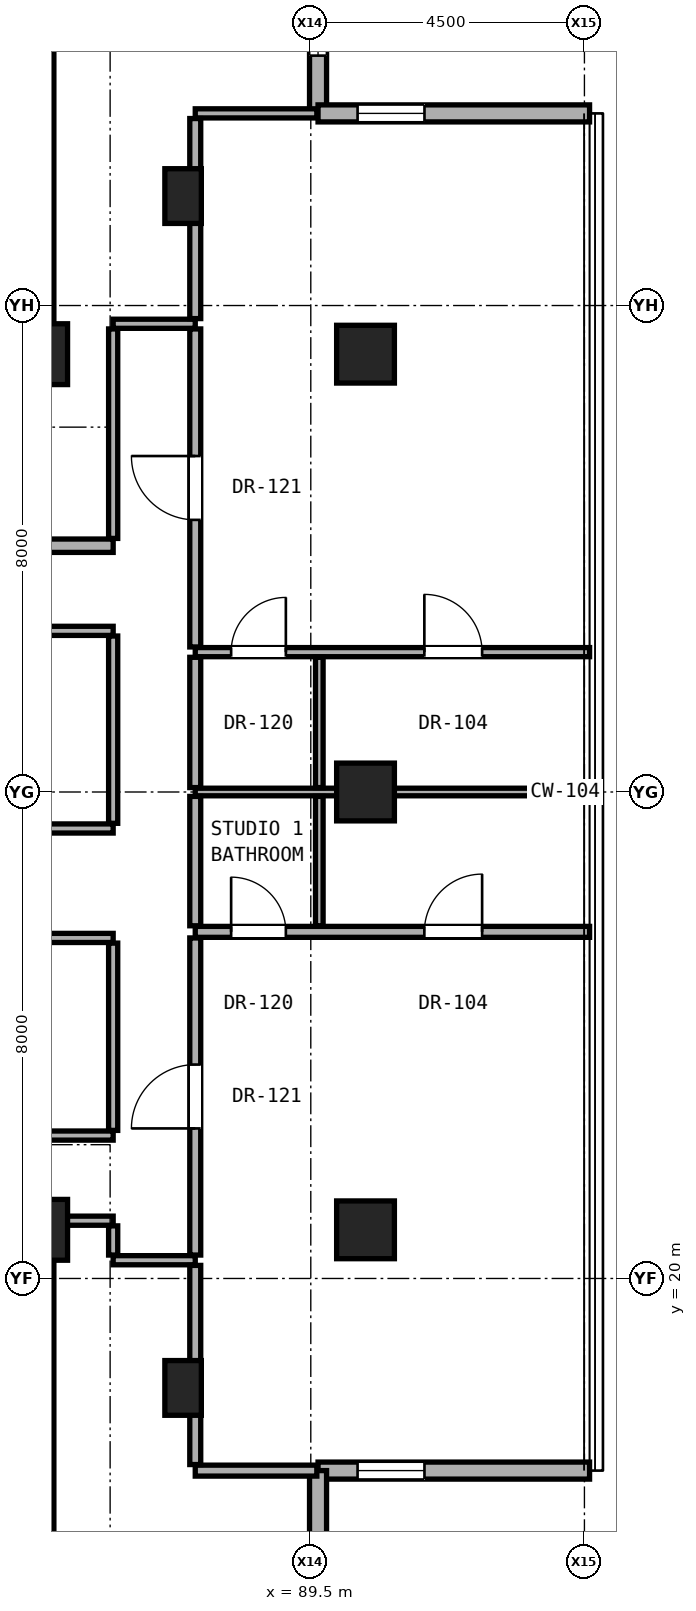
"""IFC4 building model, lengths in metres.
Left out: names, types, materials, properties, quantities, classifications, styles, units other than length and angle.
Written with IfcOpenShell. Run it as: python <this file> out.ifc"""

import sys

from ifc_helpers import new_model, si_unit, direction, frame, frame_2d, origin, origin_2d, place, context, subcontext, project, spatial, rectangle, hollow_rectangle, extrude, element, fill, save


model = new_model("IFC4")
c1 = context("Model", 3, precision=1e-05, world=origin(), true_north=direction((0.0, 1.0)))
c2 = subcontext(c1, "Body", "Model", "MODEL_VIEW")
j1 = project(units=[si_unit("LENGTHUNIT", "METRE"), si_unit("PLANEANGLEUNIT", "RADIAN")], contexts=[c1])
p1 = place(None, origin())
s1 = spatial("IfcSite", under=j1, at=p1, CompositionType="ELEMENT")
p2 = place(p1, origin())
s2 = spatial("IfcBuilding", under=s1, at=p2, CompositionType="ELEMENT")
p3 = place(p2, frame((0.0, 0.0, 167.4)))
s3 = spatial("IfcBuildingStorey", under=s2, at=p3, CompositionType="ELEMENT", Elevation=167.4)
for number, where, z_axis, x_axis in (
    (1, (85.0, 20.8, 0.0), (0.0, 0.0, 1.0), (1.0, 0.0, 0.0)),
    (2, (85.0, 35.2, 0.0), (0.0, 0.0, 1.0), (1.0, 0.0, 0.0)),
):
    element("IfcColumn", number, at=place(p3, frame(where, z_axis=z_axis, x_axis=x_axis)), inside=s3, PredefinedType="COLUMN", context=c2, shape_type="SweptSolid", body=[
        extrude(rectangle(XDim=1.0, YDim=1.0, at=origin_2d()), origin(), (0.0, 0.0, 1.0), 3.25),
    ])
for number, where, z_axis, x_axis in (
    (3, (90.4, 20.8, 0.0), (0.0, 0.0, 1.0), (1.0, 0.0, 0.0)),
    (4, (90.4, 28.0, 0.0), (0.0, 0.0, 1.0), (1.0, 0.0, 0.0)),
    (5, (90.4, 35.2, 0.0), (0.0, 0.0, 1.0), (1.0, 0.0, 0.0)),
):
    element("IfcColumn", number, at=place(p3, frame(where, z_axis=z_axis, x_axis=x_axis)), inside=s3, PredefinedType="COLUMN", context=c2, shape_type="SweptSolid", body=[
        extrude(hollow_rectangle(XDim=0.95, YDim=0.95, WallThickness=0.05, at=origin_2d()), origin(), (0.0, 0.0, 1.0), 3.25),
    ])
for number, where, z_axis, x_axis in (
    (6, (87.4, 18.2, 0.0), (0.0, 0.0, 1.0), (1.0, 0.0, 0.0)),
    (7, (87.4, 37.8, 0.0), (0.0, 0.0, 1.0), (1.0, 0.0, 0.0)),
):
    element("IfcColumn", number, at=place(p3, frame(where, z_axis=z_axis, x_axis=x_axis)), inside=s3, PredefinedType="PILASTER", context=c2, shape_type="SweptSolid", body=[
        extrude(rectangle(XDim=0.6, YDim=0.9, at=origin_2d()), origin(), (0.0, 0.0, 1.0), 3.25),
    ])
for number, where, z_axis, x_axis in (
    (8, (85.0, 35.2, 0.0), (0.0, 0.0, 1.0), (0.0, 1.0, 0.0)),
    (9, (85.0, 15.2, 0.0), (0.0, 0.0, 1.0), (0.0, 1.0, 0.0)),
):
    element("IfcWall", number, at=place(p3, frame(where, z_axis=z_axis, x_axis=x_axis)), inside=s3, PredefinedType="SHEAR", context=c2, shape_type="SweptSolid", body=[
        extrude(rectangle(XDim=5.6, YDim=0.55, at=frame_2d((2.8, 0.0))), origin(), (0.0, 0.0, 1.0), 3.05),
    ])
p4 = place(p3, frame((89.619, 39.159, 0.0), z_axis=(0.0, 0.0, 1.0), x_axis=(0.0, 1.0, 0.0)))
e10 = element("IfcWall", 10, at=p4, inside=s3, PredefinedType="SOLIDWALL", context=c2, shape_type="SweptSolid", body=[
    extrude(rectangle(XDim=4.465, YDim=0.28, at=frame_2d((2.233, 0.0))), origin(), (0.0, 0.0, 1.0), 3.03),
])
p5 = place(p4, frame((0.95, 0.0, 0.85)))
e11 = element("IfcOpeningElement", 11, at=p5, cuts=e10, PredefinedType="OPENING", context=c2, shape_type="SweptSolid", body=[
    extrude(rectangle(XDim=1.1, YDim=2.0, at=frame_2d((0.55, 1.0))), frame((0.0, 0.15, 0.0), z_axis=(0.0, -1.0, 0.0), x_axis=(1.0, 0.0, 0.0)), (0.0, 0.0, 1.0), 0.3),
])
p6 = place(p3, frame((89.619, 16.841, 0.0), z_axis=(0.0, 0.0, 1.0), x_axis=(1.0, 0.0, 0.0)))
e12 = element("IfcWall", 12, at=p6, inside=s3, PredefinedType="SOLIDWALL", context=c2, shape_type="SweptSolid", body=[
    extrude(rectangle(XDim=4.465, YDim=0.28, at=frame_2d((2.232, 0.0))), origin(), (0.0, 0.0, 1.0), 3.03),
])
p7 = place(p6, frame((0.65, 0.0, 0.85)))
e13 = element("IfcOpeningElement", 13, at=p7, cuts=e12, PredefinedType="OPENING", context=c2, shape_type="SweptSolid", body=[
    extrude(rectangle(XDim=1.1, YDim=2.0, at=frame_2d((0.55, 1.0))), frame((0.0, 0.15, 0.0), z_axis=(0.0, -1.0, 0.0), x_axis=(1.0, 0.0, 0.0)), (0.0, 0.0, 1.0), 0.3),
])
p8 = place(p3, frame((89.619, 12.375, 0.0), z_axis=(0.0, 0.0, 1.0), x_axis=(0.0, 1.0, 0.0)))
e14 = element("IfcWall", 14, at=p8, inside=s3, PredefinedType="SOLIDWALL", context=c2, shape_type="SweptSolid", body=[
    extrude(rectangle(XDim=4.465, YDim=0.28, at=frame_2d((2.233, 0.0))), origin(), (0.0, 0.0, 1.0), 3.03),
])
p9 = place(p3, frame((94.084, 39.159, 0.0), z_axis=(0.0, 0.0, 1.0), x_axis=(-1.0, 0.0, 0.0)))
e15 = element("IfcWall", 15, at=p9, inside=s3, PredefinedType="SOLIDWALL", context=c2, shape_type="SweptSolid", body=[
    extrude(rectangle(XDim=4.465, YDim=0.28, at=frame_2d((2.232, 0.0))), origin(), (0.0, 0.0, 1.0), 3.03),
])
p10 = place(p9, frame((2.715, 0.0, 0.85)))
e16 = element("IfcOpeningElement", 16, at=p10, cuts=e15, PredefinedType="OPENING", context=c2, shape_type="SweptSolid", body=[
    extrude(rectangle(XDim=1.1, YDim=2.0, at=frame_2d((0.55, 1.0))), frame((0.0, 0.15, 0.0), z_axis=(0.0, -1.0, 0.0), x_axis=(1.0, 0.0, 0.0)), (0.0, 0.0, 1.0), 0.3),
])
p11 = place(p3, frame((87.6, 16.84, 0.0), z_axis=(0.0, 0.0, 1.0), x_axis=(1.0, 0.0, 0.0)))
e17 = element("IfcWall", 17, at=p11, inside=s3, PredefinedType="PARTITIONING", context=c2, shape_type="SweptSolid", body=[
    extrude(rectangle(XDim=1.999, YDim=0.18, at=frame_2d((1.0, 0.0))), origin(), (0.0, 0.0, 1.0), 3.05),
])
p12 = place(p3, frame((86.25, 20.3, 0.0), z_axis=(0.0, 0.0, 1.0), x_axis=(1.0, 0.0, 0.0)))
e18 = element("IfcWall", 18, at=p12, inside=s3, PredefinedType="PARTITIONING", context=c2, shape_type="SweptSolid", body=[
    extrude(rectangle(XDim=1.35, YDim=0.15, at=frame_2d((0.675, 0.0))), origin(), (0.0, 0.0, 1.0), 3.05),
])
p13 = place(p3, frame((85.27, 20.95, 0.0), z_axis=(0.0, 0.0, 1.0), x_axis=(1.0, 0.0, 0.0)))
e19 = element("IfcWall", 19, at=p13, inside=s3, PredefinedType="PARTITIONING", context=c2, shape_type="SweptSolid", body=[
    extrude(rectangle(XDim=0.98, YDim=0.15, at=frame_2d((0.49, 0.0))), origin(), (0.0, 0.0, 1.0), 2.442),
])
p14 = place(p3, frame((78.64, 22.35, 0.0), z_axis=(0.0, 0.0, 1.0), x_axis=(1.0, 0.0, 0.0)))
e20 = element("IfcWall", 20, at=p14, inside=s3, PredefinedType="PARTITIONING", context=c2, shape_type="SweptSolid", body=[
    extrude(rectangle(XDim=7.61, YDim=0.15, at=frame_2d((3.805, 0.0))), origin(), (0.0, 0.0, 1.0), 2.186),
])
p15 = place(p14, frame((3.33, 0.0, 0.0)))
e21 = element("IfcOpeningElement", 21, at=p15, cuts=e20, PredefinedType="OPENING", context=c2, shape_type="SweptSolid", body=[
    extrude(rectangle(XDim=0.95, YDim=2.15, at=frame_2d((0.475, 1.075))), frame((0.0, 0.085, 0.0), z_axis=(0.0, -1.0, 0.0), x_axis=(1.0, 0.0, 0.0)), (0.0, 0.0, 1.0), 0.17),
])
p16 = place(p3, frame((78.6, 25.6, 0.0), z_axis=(0.0, 0.0, 1.0), x_axis=(1.0, 0.0, 0.0)))
e22 = element("IfcWall", 22, at=p16, inside=s3, PredefinedType="PARTITIONING", context=c2, shape_type="SweptSolid", body=[
    extrude(rectangle(XDim=7.65, YDim=0.15, at=frame_2d((3.825, 0.0))), origin(), (0.0, 0.0, 1.0), 2.186),
])
p17 = place(p3, frame((87.6, 25.7, 0.0), z_axis=(0.0, 0.0, 1.0), x_axis=(1.0, 0.0, 0.0)))
e23 = element("IfcWall", 23, at=p17, inside=s3, PredefinedType="PARTITIONING", context=c2, shape_type="SweptSolid", body=[
    extrude(rectangle(XDim=6.485, YDim=0.18, at=frame_2d((3.242, 0.0))), origin(), (0.0, 0.0, 1.0), 2.269),
])
p18 = place(p17, frame((3.768, 0.0, 0.0)))
e24 = element("IfcOpeningElement", 24, at=p18, cuts=e23, PredefinedType="OPENING", context=c2, shape_type="SweptSolid", body=[
    extrude(rectangle(XDim=0.95, YDim=2.15, at=frame_2d((0.475, 1.075))), frame((0.0, 0.1, 0.0), z_axis=(0.0, -1.0, 0.0), x_axis=(1.0, 0.0, 0.0)), (0.0, 0.0, 1.0), 0.2),
])
p19 = place(p17, frame((0.59, 0.0, 0.0)))
e25 = element("IfcOpeningElement", 25, at=p19, cuts=e23, PredefinedType="OPENING", context=c2, shape_type="SweptSolid", body=[
    extrude(rectangle(XDim=0.9, YDim=2.1, at=frame_2d((0.45, 1.05))), frame((0.0, 0.1, 0.0), z_axis=(0.0, -1.0, 0.0), x_axis=(1.0, 0.0, 0.0)), (0.0, 0.0, 1.0), 0.2),
])
p20 = place(p3, frame((78.6, 27.4, 0.0), z_axis=(0.0, 0.0, 1.0), x_axis=(1.0, 0.0, 0.0)))
e26 = element("IfcWall", 26, at=p20, inside=s3, PredefinedType="PARTITIONING", context=c2, shape_type="SweptSolid", body=[
    extrude(rectangle(XDim=7.65, YDim=0.15, at=frame_2d((3.825, 0.0))), origin(), (0.0, 0.0, 1.0), 2.186),
])
p21 = place(p3, frame((87.6, 28.0, 0.0), z_axis=(0.0, 0.0, 1.0), x_axis=(1.0, 0.0, 0.0)))
e27 = element("IfcWall", 27, at=p21, inside=s3, PredefinedType="PARTITIONING", context=c2, shape_type="SweptSolid", body=[
    extrude(rectangle(XDim=6.485, YDim=0.125, at=frame_2d((3.242, 0.0))), origin(), (0.0, 0.0, 1.0), 2.269),
])
p22 = place(p3, frame((87.6, 30.3, 0.0), z_axis=(0.0, 0.0, 1.0), x_axis=(1.0, 0.0, 0.0)))
e28 = element("IfcWall", 28, at=p22, inside=s3, PredefinedType="PARTITIONING", context=c2, shape_type="SweptSolid", body=[
    extrude(rectangle(XDim=6.485, YDim=0.15, at=frame_2d((3.242, 0.0))), origin(), (0.0, 0.0, 1.0), 2.269),
])
p23 = place(p22, frame((3.768, 0.0, 0.0)))
e29 = element("IfcOpeningElement", 29, at=p23, cuts=e28, PredefinedType="OPENING", context=c2, shape_type="SweptSolid", body=[
    extrude(rectangle(XDim=0.95, YDim=2.15, at=frame_2d((0.475, 1.075))), frame((0.0, 0.085, 0.0), z_axis=(0.0, -1.0, 0.0), x_axis=(1.0, 0.0, 0.0)), (0.0, 0.0, 1.0), 0.17),
])
p24 = place(p22, frame((0.59, 0.0, 0.0)))
e30 = element("IfcOpeningElement", 30, at=p24, cuts=e28, PredefinedType="OPENING", context=c2, shape_type="SweptSolid", body=[
    extrude(rectangle(XDim=0.9, YDim=2.1, at=frame_2d((0.45, 1.05))), frame((0.0, 0.085, 0.0), z_axis=(0.0, -1.0, 0.0), x_axis=(1.0, 0.0, 0.0)), (0.0, 0.0, 1.0), 0.17),
])
p25 = place(p3, frame((78.64, 30.65, 0.0), z_axis=(0.0, 0.0, 1.0), x_axis=(1.0, 0.0, 0.0)))
e31 = element("IfcWall", 31, at=p25, inside=s3, PredefinedType="PARTITIONING", context=c2, shape_type="SweptSolid", body=[
    extrude(rectangle(XDim=7.61, YDim=0.15, at=frame_2d((3.805, 0.0))), origin(), (0.0, 0.0, 1.0), 2.186),
])
p26 = place(p25, frame((3.33, 0.0, 0.0)))
e32 = element("IfcOpeningElement", 32, at=p26, cuts=e31, PredefinedType="OPENING", context=c2, shape_type="SweptSolid", body=[
    extrude(rectangle(XDim=0.95, YDim=2.15, at=frame_2d((0.475, 1.075))), frame((0.0, 0.085, 0.0), z_axis=(0.0, -1.0, 0.0), x_axis=(1.0, 0.0, 0.0)), (0.0, 0.0, 1.0), 0.17),
])
p27 = place(p3, frame((71.55, 32.05, 0.0), z_axis=(0.0, 0.0, 1.0), x_axis=(1.0, 0.0, 0.0)))
e33 = element("IfcWall", 33, at=p27, inside=s3, PredefinedType="SOLIDWALL", context=c2, shape_type="SweptSolid", body=[
    extrude(rectangle(XDim=14.7, YDim=0.22, at=frame_2d((7.35, 0.0))), origin(), (0.0, 0.0, 1.0), 2.186),
])
p28 = place(p27, frame((6.065, 0.0, 0.0)))
e34 = element("IfcOpeningElement", 34, at=p28, cuts=e33, PredefinedType="OPENING", context=c2, shape_type="SweptSolid", body=[
    extrude(rectangle(XDim=0.85, YDim=2.01, at=frame_2d((0.425, 1.005))), frame((0.0, 0.12, 0.0), z_axis=(0.0, -1.0, 0.0), x_axis=(1.0, 0.0, 0.0)), (0.0, 0.0, 1.0), 0.24),
])
p29 = place(p27, frame((10.535, 0.0, 0.0)))
e35 = element("IfcOpeningElement", 35, at=p29, cuts=e33, PredefinedType="OPENING", context=c2, shape_type="SweptSolid", body=[
    extrude(rectangle(XDim=0.95, YDim=2.15, at=frame_2d((0.475, 1.075))), frame((0.0, 0.12, 0.0), z_axis=(0.0, -1.0, 0.0), x_axis=(1.0, 0.0, 0.0)), (0.0, 0.0, 1.0), 0.24),
])
p30 = place(p27, frame((1.65, 0.0, 0.0)))
e36 = element("IfcOpeningElement", 36, at=p30, cuts=e33, PredefinedType="OPENING", context=c2, shape_type="SweptSolid", body=[
    extrude(rectangle(XDim=0.85, YDim=2.01, at=frame_2d((0.425, 1.005))), frame((0.0, 0.12, 0.0), z_axis=(0.0, -1.0, 0.0), x_axis=(1.0, 0.0, 0.0)), (0.0, 0.0, 1.0), 0.24),
])
p31 = place(p3, frame((86.25, 35.7, 0.0), z_axis=(0.0, 0.0, 1.0), x_axis=(1.0, 0.0, 0.0)))
e37 = element("IfcWall", 37, at=p31, inside=s3, PredefinedType="PARTITIONING", context=c2, shape_type="SweptSolid", body=[
    extrude(rectangle(XDim=1.35, YDim=0.15, at=frame_2d((0.675, 0.0))), origin(), (0.0, 0.0, 1.0), 3.05),
])
p32 = place(p3, frame((87.6, 39.16, 0.0), z_axis=(0.0, 0.0, 1.0), x_axis=(1.0, 0.0, 0.0)))
e38 = element("IfcWall", 38, at=p32, inside=s3, PredefinedType="PARTITIONING", context=c2, shape_type="SweptSolid", body=[
    extrude(rectangle(XDim=1.999, YDim=0.15, at=frame_2d((1.0, 0.0))), origin(), (0.0, 0.0, 1.0), 3.05),
])
p33 = place(p3, frame((86.25, 20.385, 0.0), z_axis=(0.0, 0.0, 1.0), x_axis=(0.0, 1.0, 0.0)))
e39 = element("IfcWall", 39, at=p33, inside=s3, PredefinedType="PARTITIONING", context=c2, shape_type="SweptSolid", body=[
    extrude(rectangle(XDim=0.48, YDim=0.15, at=frame_2d((0.24, 0.0))), origin(), (0.0, 0.0, 1.0), 2.442),
])
p34 = place(p3, frame((86.25, 22.435, 0.0), z_axis=(0.0, 0.0, 1.0), x_axis=(0.0, 1.0, 0.0)))
e40 = element("IfcWall", 40, at=p34, inside=s3, PredefinedType="PARTITIONING", context=c2, shape_type="SweptSolid", body=[
    extrude(rectangle(XDim=3.08, YDim=0.15, at=frame_2d((1.54, 0.0))), origin(), (0.0, 0.0, 1.0), 3.05),
])
p35 = place(p3, frame((86.25, 27.485, 0.0), z_axis=(0.0, 0.0, 1.0), x_axis=(0.0, 1.0, 0.0)))
e41 = element("IfcWall", 41, at=p35, inside=s3, PredefinedType="PARTITIONING", context=c2, shape_type="SweptSolid", body=[
    extrude(rectangle(XDim=3.08, YDim=0.15, at=frame_2d((1.54, 0.0))), origin(), (0.0, 0.0, 1.0), 2.346),
])
p36 = place(p3, frame((86.25, 32.17, 0.0), z_axis=(0.0, 0.0, 1.0), x_axis=(0.0, 1.0, 0.0)))
e42 = element("IfcWall", 42, at=p36, inside=s3, PredefinedType="PARTITIONING", context=c2, shape_type="SweptSolid", body=[
    extrude(rectangle(XDim=3.445, YDim=0.15, at=frame_2d((1.723, 0.0))), origin(), (0.0, 0.0, 1.0), 2.442),
])
p37 = place(p3, frame((87.6, 16.94, 0.0), z_axis=(0.0, 0.0, 1.0), x_axis=(0.0, 1.0, 0.0)))
e43 = element("IfcWall", 43, at=p37, inside=s3, PredefinedType="PARTITIONING", context=c2, shape_type="SweptSolid", body=[
    extrude(rectangle(XDim=3.275, YDim=0.18, at=frame_2d((1.638, 0.0))), origin(), (0.0, 0.0, 1.0), 2.493),
])
p38 = place(p3, frame((87.6, 20.385, 0.0), z_axis=(0.0, 0.0, 1.0), x_axis=(0.0, 1.0, 0.0)))
e44 = element("IfcWall", 44, at=p38, inside=s3, PredefinedType="PARTITIONING", context=c2, shape_type="SweptSolid", body=[
    extrude(rectangle(XDim=5.215, YDim=0.18, at=frame_2d((2.607, 0.0))), origin(), (0.0, 0.0, 1.0), 2.442),
])
p39 = place(p38, frame((2.083, 0.0, 0.0)))
e45 = element("IfcOpeningElement", 45, at=p39, cuts=e44, PredefinedType="OPENING", context=c2, shape_type="SweptSolid", body=[
    extrude(rectangle(XDim=1.05, YDim=2.2, at=frame_2d((0.525, 1.1))), frame((0.0, 0.1, 0.0), z_axis=(0.0, -1.0, 0.0), x_axis=(1.0, 0.0, 0.0)), (0.0, 0.0, 1.0), 0.2),
])
p40 = place(p3, frame((87.6, 25.8, 0.0), z_axis=(0.0, 0.0, 1.0), x_axis=(0.0, 1.0, 0.0)))
e46 = element("IfcWall", 46, at=p40, inside=s3, PredefinedType="PARTITIONING", context=c2, shape_type="SweptSolid", body=[
    extrude(rectangle(XDim=2.127, YDim=0.18, at=frame_2d((1.064, 0.0))), origin(), (0.0, 0.0, 1.0), 2.346),
])
p41 = place(p3, frame((87.6, 28.073, 0.0), z_axis=(0.0, 0.0, 1.0), x_axis=(0.0, 1.0, 0.0)))
e47 = element("IfcWall", 47, at=p41, inside=s3, PredefinedType="PARTITIONING", context=c2, shape_type="SweptSolid", body=[
    extrude(rectangle(XDim=2.143, YDim=0.18, at=frame_2d((1.071, 0.0))), origin(), (0.0, 0.0, 1.0), 2.346),
])
p42 = place(p3, frame((87.6, 30.385, 0.0), z_axis=(0.0, 0.0, 1.0), x_axis=(0.0, 1.0, 0.0)))
e48 = element("IfcWall", 48, at=p42, inside=s3, PredefinedType="PARTITIONING", context=c2, shape_type="SweptSolid", body=[
    extrude(rectangle(XDim=5.23, YDim=0.18, at=frame_2d((2.615, 0.0))), origin(), (0.0, 0.0, 1.0), 2.442),
])
p43 = place(p42, frame((2.09, 0.0, 0.0)))
e49 = element("IfcOpeningElement", 49, at=p43, cuts=e48, PredefinedType="OPENING", context=c2, shape_type="SweptSolid", body=[
    extrude(rectangle(XDim=1.05, YDim=2.2, at=frame_2d((0.525, 1.1))), frame((0.0, 0.1, 0.0), z_axis=(0.0, -1.0, 0.0), x_axis=(1.0, 0.0, 0.0)), (0.0, 0.0, 1.0), 0.2),
])
p44 = place(p3, frame((87.6, 35.785, 0.0), z_axis=(0.0, 0.0, 1.0), x_axis=(0.0, 1.0, 0.0)))
e50 = element("IfcWall", 50, at=p44, inside=s3, PredefinedType="PARTITIONING", context=c2, shape_type="SweptSolid", body=[
    extrude(rectangle(XDim=3.29, YDim=0.18, at=frame_2d((1.645, 0.0))), origin(), (0.0, 0.0, 1.0), 2.493),
])
p45 = place(p3, frame((89.64, 25.8, 0.0), z_axis=(0.0, 0.0, 1.0), x_axis=(0.0, 1.0, 0.0)))
e51 = element("IfcWall", 51, at=p45, inside=s3, PredefinedType="PARTITIONING", context=c2, shape_type="SweptSolid", body=[
    extrude(rectangle(XDim=2.127, YDim=0.125, at=frame_2d((1.064, 0.0))), origin(), (0.0, 0.0, 1.0), 2.346),
])
p46 = place(p3, frame((89.64, 28.073, 0.0), z_axis=(0.0, 0.0, 1.0), x_axis=(0.0, 1.0, 0.0)))
e52 = element("IfcWall", 52, at=p46, inside=s3, PredefinedType="PARTITIONING", context=c2, shape_type="SweptSolid", body=[
    extrude(rectangle(XDim=2.143, YDim=0.125, at=frame_2d((1.071, 0.0))), origin(), (0.0, 0.0, 1.0), 2.346),
])
p47 = place(p5, origin())
e53 = element("IfcWindow", 53, at=p47, inside=s3, PartitioningType="SINGLE_PANEL", PredefinedType="WINDOW", context=c2, shape_type="SweptSolid", body=[
    extrude(rectangle(XDim=1.1, YDim=2.0, at=frame_2d((0.55, 1.0))), frame((0.0, 0.03, 0.0), z_axis=(0.0, -1.0, 0.0), x_axis=(1.0, 0.0, 0.0)), (0.0, 0.0, 1.0), 0.06),
])
fill(e11, e53)
p48 = place(p7, origin())
e54 = element("IfcWindow", 54, at=p48, inside=s3, PartitioningType="SINGLE_PANEL", PredefinedType="WINDOW", context=c2, shape_type="SweptSolid", body=[
    extrude(rectangle(XDim=1.1, YDim=2.0, at=frame_2d((0.55, 1.0))), frame((0.0, 0.03, 0.0), z_axis=(0.0, -1.0, 0.0), x_axis=(1.0, 0.0, 0.0)), (0.0, 0.0, 1.0), 0.06),
])
fill(e13, e54)
p49 = place(p10, origin())
e55 = element("IfcWindow", 55, at=p49, inside=s3, PartitioningType="SINGLE_PANEL", PredefinedType="WINDOW", context=c2, shape_type="SweptSolid", body=[
    extrude(rectangle(XDim=1.1, YDim=2.0, at=frame_2d((0.55, 1.0))), frame((0.0, 0.03, 0.0), z_axis=(0.0, -1.0, 0.0), x_axis=(1.0, 0.0, 0.0)), (0.0, 0.0, 1.0), 0.06),
])
fill(e16, e55)
p50 = place(p39, origin())
e56 = element("IfcDoor", 56, at=p50, inside=s3, OperationType="SINGLE_SWING_LEFT", PredefinedType="DOOR", context=c2, shape_type="SweptSolid", body=[
    extrude(rectangle(XDim=1.05, YDim=2.2, at=frame_2d((0.525, 1.1))), frame((0.0, 0.025, 0.0), z_axis=(0.0, -1.0, 0.0), x_axis=(1.0, 0.0, 0.0)), (0.0, 0.0, 1.0), 0.05),
])
fill(e45, e56)
p51 = place(p18, origin())
e57 = element("IfcDoor", 57, at=p51, inside=s3, OperationType="SINGLE_SWING_RIGHT", PredefinedType="DOOR", context=c2, shape_type="SweptSolid", body=[
    extrude(rectangle(XDim=0.95, YDim=2.15, at=frame_2d((0.475, 1.075))), frame((0.0, 0.025, 0.0), z_axis=(0.0, -1.0, 0.0), x_axis=(1.0, 0.0, 0.0)), (0.0, 0.0, 1.0), 0.05),
])
fill(e24, e57)
p52 = place(p19, origin())
e58 = element("IfcDoor", 58, at=p52, inside=s3, OperationType="SINGLE_SWING_LEFT", PredefinedType="DOOR", context=c2, shape_type="SweptSolid", body=[
    extrude(rectangle(XDim=0.9, YDim=2.1, at=frame_2d((0.45, 1.05))), frame((0.0, 0.025, 0.0), z_axis=(0.0, -1.0, 0.0), x_axis=(1.0, 0.0, 0.0)), (0.0, 0.0, 1.0), 0.05),
])
fill(e25, e58)
p53 = place(p43, origin())
e59 = element("IfcDoor", 59, at=p53, inside=s3, OperationType="SINGLE_SWING_RIGHT", PredefinedType="DOOR", context=c2, shape_type="SweptSolid", body=[
    extrude(rectangle(XDim=1.05, YDim=2.2, at=frame_2d((0.525, 1.1))), frame((0.0, 0.025, 0.0), z_axis=(0.0, -1.0, 0.0), x_axis=(1.0, 0.0, 0.0)), (0.0, 0.0, 1.0), 0.05),
])
fill(e49, e59)
p54 = place(p23, origin())
e60 = element("IfcDoor", 60, at=p54, inside=s3, OperationType="SINGLE_SWING_LEFT", PredefinedType="DOOR", context=c2, shape_type="SweptSolid", body=[
    extrude(rectangle(XDim=0.95, YDim=2.15, at=frame_2d((0.475, 1.075))), frame((0.0, 0.025, 0.0), z_axis=(0.0, -1.0, 0.0), x_axis=(1.0, 0.0, 0.0)), (0.0, 0.0, 1.0), 0.05),
])
fill(e29, e60)
p55 = place(p24, origin())
e61 = element("IfcDoor", 61, at=p55, inside=s3, OperationType="SINGLE_SWING_RIGHT", PredefinedType="DOOR", context=c2, shape_type="SweptSolid", body=[
    extrude(rectangle(XDim=0.9, YDim=2.1, at=frame_2d((0.45, 1.05))), frame((0.0, 0.025, 0.0), z_axis=(0.0, -1.0, 0.0), x_axis=(1.0, 0.0, 0.0)), (0.0, 0.0, 1.0), 0.05),
])
fill(e30, e61)
save(model, sys.argv[1])
